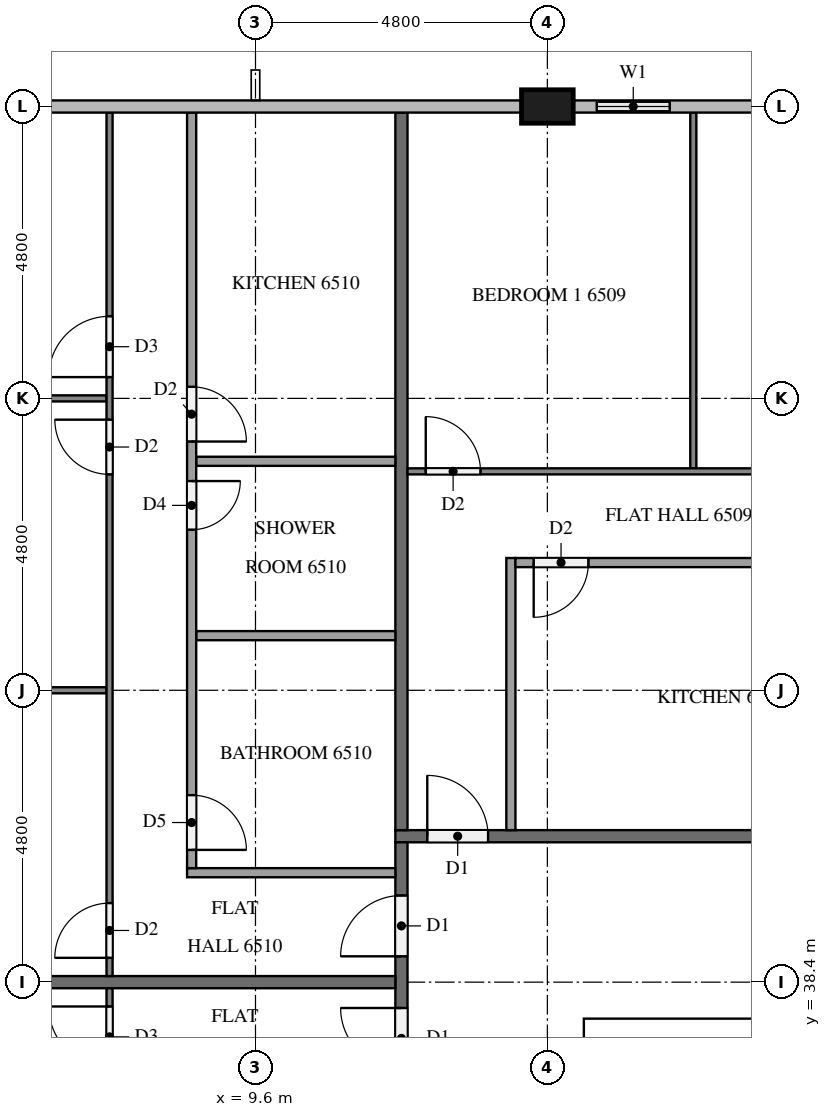
"""IFC4 building model, lengths in metres.
Left out: names, types, materials, properties, quantities, classifications, styles, units other than length and angle.
Written with IfcOpenShell. Run it as: python <this file> out.ifc"""

import sys

from ifc_helpers import new_model, si_unit, direction, frame, frame_2d, origin, origin_2d, place, context, subcontext, project, spatial, rectangle, extrude, element, fill, save


model = new_model("IFC4")
c1 = context("Model", 3, precision=1e-05, world=origin(), true_north=direction((0.0, 1.0)))
c2 = subcontext(c1, "Body", "Model", "MODEL_VIEW")
j1 = project(units=[si_unit("LENGTHUNIT", "METRE"), si_unit("PLANEANGLEUNIT", "RADIAN")], contexts=[c1])
p1 = place(None, origin())
s1 = spatial("IfcSite", under=j1, at=p1, CompositionType="ELEMENT")
p2 = place(p1, origin())
s2 = spatial("IfcBuilding", under=s1, at=p2, CompositionType="ELEMENT")
p3 = place(p2, frame((0.0, 0.0, 249.2)))
s3 = spatial("IfcBuildingStorey", under=s2, at=p3, CompositionType="ELEMENT", Elevation=249.2)
p4 = place(p3, frame((15.0, 37.5, 0.0), z_axis=(0.0, 0.0, 1.0), x_axis=(1.0, 0.0, 0.0)))
e1 = element("IfcWall", 1, at=p4, inside=s3, PredefinedType="SHEAR", context=c2, shape_type="SweptSolid", body=[
    extrude(rectangle(XDim=32.4, YDim=0.6, at=frame_2d((16.2, 0.0))), origin(), (0.0, 0.0, 1.0), 3.2),
])
p5 = place(p4, frame((15.3, 0.0, 0.0)))
e2 = element("IfcOpeningElement", 2, at=p5, cuts=e1, PredefinedType="OPENING", context=c2, shape_type="SweptSolid", body=[
    extrude(rectangle(XDim=1.8, YDim=2.1, at=frame_2d((0.9, 1.05))), frame((0.0, 0.31, 0.0), z_axis=(0.0, -1.0, 0.0), x_axis=(1.0, 0.0, 0.0)), (0.0, 0.0, 1.0), 0.62),
])
p6 = place(p4, frame((1.25, 0.0, 0.0)))
e3 = element("IfcOpeningElement", 3, at=p6, cuts=e1, PredefinedType="OPENING", context=c2, shape_type="SweptSolid", body=[
    extrude(rectangle(XDim=1.0, YDim=2.1, at=frame_2d((0.5, 1.05))), frame((0.0, 0.31, 0.0), z_axis=(0.0, -1.0, 0.0), x_axis=(1.0, 0.0, 0.0)), (0.0, 0.0, 1.0), 0.62),
])
p7 = place(p4, frame((4.988, 0.0, 0.0)))
e4 = element("IfcOpeningElement", 4, at=p7, cuts=e1, PredefinedType="OPENING", context=c2, shape_type="SweptSolid", body=[
    extrude(rectangle(XDim=1.0, YDim=2.1, at=frame_2d((0.5, 1.05))), frame((0.0, 0.31, 0.0), z_axis=(0.0, -1.0, 0.0), x_axis=(1.0, 0.0, 0.0)), (0.0, 0.0, 1.0), 0.62),
])
p8 = place(p3, frame((14.4, 52.8, 0.0), z_axis=(0.0, 0.0, 1.0), x_axis=(1.0, 0.0, 0.0)))
e5 = element("IfcColumn", 5, at=p8, inside=s3, PredefinedType="COLUMN", context=c2, shape_type="SweptSolid", body=[
    extrude(rectangle(XDim=0.85, YDim=0.55, at=origin_2d()), origin(), (0.0, 0.0, 1.0), 3.2),
])
p9 = place(p3, frame((16.8, 52.8, 0.0), z_axis=(0.0, 0.0, 1.0), x_axis=(-1.0, 0.0, 0.0)))
e6 = element("IfcWall", 6, at=p9, inside=s3, PredefinedType="SOLIDWALL", context=c2, shape_type="SweptSolid", body=[
    extrude(rectangle(XDim=1.975, YDim=0.15, at=frame_2d((0.988, 0.0))), origin(), (0.0, 0.0, 1.0), 3.2),
])
p10 = place(p9, frame((0.387, 0.0, 0.9)))
e7 = element("IfcOpeningElement", 7, at=p10, cuts=e6, PredefinedType="OPENING", context=c2, shape_type="SweptSolid", body=[
    extrude(rectangle(XDim=1.2, YDim=1.4, at=frame_2d((0.6, 0.7))), frame((0.0, 0.085, 0.0), z_axis=(0.0, -1.0, 0.0), x_axis=(1.0, 0.0, 0.0)), (0.0, 0.0, 1.0), 0.17),
])
p11 = place(p3, frame((11.9, 40.8, 0.0), z_axis=(0.0, 0.0, 1.0), x_axis=(1.0, 0.0, 0.0)))
e8 = element("IfcWall", 8, at=p11, inside=s3, PredefinedType="PARTITIONING", context=c2, shape_type="SweptSolid", body=[
    extrude(rectangle(XDim=38.6, YDim=0.2, at=frame_2d((19.3, 0.0))), origin(), (0.0, 0.0, 1.0), 3.2),
])
p12 = place(p11, frame((31.725, 0.0, 0.0)))
e9 = element("IfcOpeningElement", 9, at=p12, cuts=e8, PredefinedType="OPENING", context=c2, shape_type="SweptSolid", body=[
    extrude(rectangle(XDim=1.0, YDim=2.1, at=frame_2d((0.5, 1.05))), frame((0.0, 0.11, 0.0), z_axis=(0.0, -1.0, 0.0), x_axis=(1.0, 0.0, 0.0)), (0.0, 0.0, 1.0), 0.22),
])
p13 = place(p11, frame((17.325, 0.0, 0.0)))
e10 = element("IfcOpeningElement", 10, at=p13, cuts=e8, PredefinedType="OPENING", context=c2, shape_type="SweptSolid", body=[
    extrude(rectangle(XDim=1.0, YDim=2.1, at=frame_2d((0.5, 1.05))), frame((0.0, 0.11, 0.0), z_axis=(0.0, -1.0, 0.0), x_axis=(1.0, 0.0, 0.0)), (0.0, 0.0, 1.0), 0.22),
])
p14 = place(p11, frame((0.525, 0.0, 0.0)))
e11 = element("IfcOpeningElement", 11, at=p14, cuts=e8, PredefinedType="OPENING", context=c2, shape_type="SweptSolid", body=[
    extrude(rectangle(XDim=1.0, YDim=2.1, at=frame_2d((0.5, 1.05))), frame((0.0, 0.11, 0.0), z_axis=(0.0, -1.0, 0.0), x_axis=(1.0, 0.0, 0.0)), (0.0, 0.0, 1.0), 0.22),
])
p15 = place(p3, frame((12.0, 12.1, 0.0), z_axis=(0.0, 0.0, 1.0), x_axis=(0.0, 1.0, 0.0)))
e12 = element("IfcWall", 12, at=p15, inside=s3, PredefinedType="PARTITIONING", context=c2, shape_type="SweptSolid", body=[
    extrude(rectangle(XDim=28.6, YDim=0.2, at=frame_2d((14.3, 0.0))), origin(), (0.0, 0.0, 1.0), 3.2),
])
p16 = place(p15, frame((26.725, 0.0, 0.0)))
e13 = element("IfcOpeningElement", 13, at=p16, cuts=e12, PredefinedType="OPENING", context=c2, shape_type="SweptSolid", body=[
    extrude(rectangle(XDim=1.0, YDim=2.1, at=frame_2d((0.5, 1.05))), frame((0.0, 0.11, 0.0), z_axis=(0.0, -1.0, 0.0), x_axis=(1.0, 0.0, 0.0)), (0.0, 0.0, 1.0), 0.22),
])
p17 = place(p15, frame((24.875, 0.0, 0.0)))
e14 = element("IfcOpeningElement", 14, at=p17, cuts=e12, PredefinedType="OPENING", context=c2, shape_type="SweptSolid", body=[
    extrude(rectangle(XDim=1.0, YDim=2.1, at=frame_2d((0.5, 1.05))), frame((0.0, 0.11, 0.0), z_axis=(0.0, -1.0, 0.0), x_axis=(1.0, 0.0, 0.0)), (0.0, 0.0, 1.0), 0.22),
])
p18 = place(p15, frame((17.675, 0.0, 0.0)))
e15 = element("IfcOpeningElement", 15, at=p18, cuts=e12, PredefinedType="OPENING", context=c2, shape_type="SweptSolid", body=[
    extrude(rectangle(XDim=1.0, YDim=2.1, at=frame_2d((0.5, 1.05))), frame((0.0, 0.11, 0.0), z_axis=(0.0, -1.0, 0.0), x_axis=(1.0, 0.0, 0.0)), (0.0, 0.0, 1.0), 0.22),
])
p19 = place(p15, frame((2.725, 0.0, 0.0)))
e16 = element("IfcOpeningElement", 16, at=p19, cuts=e12, PredefinedType="OPENING", context=c2, shape_type="SweptSolid", body=[
    extrude(rectangle(XDim=1.0, YDim=2.1, at=frame_2d((0.5, 1.05))), frame((0.0, 0.11, 0.0), z_axis=(0.0, -1.0, 0.0), x_axis=(1.0, 0.0, 0.0)), (0.0, 0.0, 1.0), 0.22),
])
p20 = place(p15, frame((0.875, 0.0, 0.0)))
e17 = element("IfcOpeningElement", 17, at=p20, cuts=e12, PredefinedType="OPENING", context=c2, shape_type="SweptSolid", body=[
    extrude(rectangle(XDim=1.0, YDim=2.1, at=frame_2d((0.5, 1.05))), frame((0.0, 0.11, 0.0), z_axis=(0.0, -1.0, 0.0), x_axis=(1.0, 0.0, 0.0)), (0.0, 0.0, 1.0), 0.22),
])
p21 = place(p3, frame((12.0, 52.7, 0.0), z_axis=(0.0, 0.0, 1.0), x_axis=(0.0, -1.0, 0.0)))
e18 = element("IfcWall", 18, at=p21, inside=s3, PredefinedType="PARTITIONING", context=c2, shape_type="SweptSolid", body=[
    extrude(rectangle(XDim=11.8, YDim=0.2, at=frame_2d((5.9, 0.0))), origin(), (0.0, 0.0, 1.0), 3.2),
])
p22 = place(p3, frame((0.275, 38.4, 0.0), z_axis=(0.0, 0.0, 1.0), x_axis=(1.0, 0.0, 0.0)))
e19 = element("IfcWall", 19, at=p22, inside=s3, PredefinedType="PARTITIONING", context=c2, shape_type="SweptSolid", body=[
    extrude(rectangle(XDim=11.625, YDim=0.2, at=frame_2d((5.812, 0.0))), origin(), (0.0, 0.0, 1.0), 3.2),
])
p23 = place(p3, frame((16.8, 46.85, 0.0), z_axis=(0.0, 0.0, 1.0), x_axis=(0.0, 1.0, 0.0)))
e20 = element("IfcWall", 20, at=p23, inside=s3, PredefinedType="PARTITIONING", context=c2, shape_type="SweptSolid", body=[
    extrude(rectangle(XDim=5.85, YDim=0.1, at=frame_2d((2.925, 0.0))), origin(), (0.0, 0.0, 1.0), 3.2),
])
p24 = place(p3, frame((12.1, 46.8, 0.0), z_axis=(0.0, 0.0, 1.0), x_axis=(1.0, 0.0, 0.0)))
e21 = element("IfcWall", 21, at=p24, inside=s3, PredefinedType="PARTITIONING", context=c2, shape_type="SweptSolid", body=[
    extrude(rectangle(XDim=16.6, YDim=0.1, at=frame_2d((8.3, 0.0))), origin(), (0.0, 0.0, 1.0), 3.2),
])
p25 = place(p24, frame((0.3, 0.0, 0.0)))
e22 = element("IfcOpeningElement", 22, at=p25, cuts=e21, PredefinedType="OPENING", context=c2, shape_type="SweptSolid", body=[
    extrude(rectangle(XDim=0.9, YDim=2.1, at=frame_2d((0.45, 1.05))), frame((0.0, 0.06, 0.0), z_axis=(0.0, -1.0, 0.0), x_axis=(1.0, 0.0, 0.0)), (0.0, 0.0, 1.0), 0.12),
])
p26 = place(p24, frame((8.25, 0.0, 0.0)))
e23 = element("IfcOpeningElement", 23, at=p26, cuts=e21, PredefinedType="OPENING", context=c2, shape_type="SweptSolid", body=[
    extrude(rectangle(XDim=0.9, YDim=2.1, at=frame_2d((0.45, 1.05))), frame((0.0, 0.06, 0.0), z_axis=(0.0, -1.0, 0.0), x_axis=(1.0, 0.0, 0.0)), (0.0, 0.0, 1.0), 0.12),
])
p27 = place(p24, frame((9.85, 0.0, 0.0)))
e24 = element("IfcOpeningElement", 24, at=p27, cuts=e21, PredefinedType="OPENING", context=c2, shape_type="SweptSolid", body=[
    extrude(rectangle(XDim=1.0, YDim=2.1, at=frame_2d((0.5, 1.05))), frame((0.0, 0.06, 0.0), z_axis=(0.0, -1.0, 0.0), x_axis=(1.0, 0.0, 0.0)), (0.0, 0.0, 1.0), 0.12),
])
p28 = place(p3, frame((13.8, 40.9, 0.0), z_axis=(0.0, 0.0, 1.0), x_axis=(0.0, 1.0, 0.0)))
e25 = element("IfcWall", 25, at=p28, inside=s3, PredefinedType="PARTITIONING", context=c2, shape_type="SweptSolid", body=[
    extrude(rectangle(XDim=4.475, YDim=0.15, at=frame_2d((2.238, 0.0))), origin(), (0.0, 0.0, 1.0), 3.2),
])
p29 = place(p3, frame((28.7, 45.3, 0.0), z_axis=(0.0, 0.0, 1.0), x_axis=(-1.0, 0.0, 0.0)))
e26 = element("IfcWall", 26, at=p29, inside=s3, PredefinedType="PARTITIONING", context=c2, shape_type="SweptSolid", body=[
    extrude(rectangle(XDim=14.825, YDim=0.15, at=frame_2d((7.413, 0.0))), origin(), (0.0, 0.0, 1.0), 3.2),
])
p30 = place(p29, frame((13.625, 0.0, 0.0)))
e27 = element("IfcOpeningElement", 27, at=p30, cuts=e26, PredefinedType="OPENING", context=c2, shape_type="SweptSolid", body=[
    extrude(rectangle(XDim=0.9, YDim=2.1, at=frame_2d((0.45, 1.05))), frame((0.0, 0.085, 0.0), z_axis=(0.0, -1.0, 0.0), x_axis=(1.0, 0.0, 0.0)), (0.0, 0.0, 1.0), 0.17),
])
p31 = place(p29, frame((4.886, 0.0, 0.0)))
e28 = element("IfcOpeningElement", 28, at=p31, cuts=e26, PredefinedType="OPENING", context=c2, shape_type="SweptSolid", body=[
    extrude(rectangle(XDim=0.8, YDim=2.1, at=frame_2d((0.4, 1.05))), frame((0.0, 0.085, 0.0), z_axis=(0.0, -1.0, 0.0), x_axis=(1.0, 0.0, 0.0)), (0.0, 0.0, 1.0), 0.17),
])
p32 = place(p29, frame((3.336, 0.0, 0.0)))
e29 = element("IfcOpeningElement", 29, at=p32, cuts=e26, PredefinedType="OPENING", context=c2, shape_type="SweptSolid", body=[
    extrude(rectangle(XDim=0.9, YDim=2.1, at=frame_2d((0.45, 1.05))), frame((0.0, 0.085, 0.0), z_axis=(0.0, -1.0, 0.0), x_axis=(1.0, 0.0, 0.0)), (0.0, 0.0, 1.0), 0.17),
])
p33 = place(p3, frame((7.15, 43.2, 0.0), z_axis=(0.0, 0.0, 1.0), x_axis=(-1.0, 0.0, 0.0)))
e30 = element("IfcWall", 30, at=p33, inside=s3, PredefinedType="PARTITIONING", context=c2, shape_type="SweptSolid", body=[
    extrude(rectangle(XDim=7.05, YDim=0.1, at=frame_2d((3.525, 0.0))), origin(), (0.0, 0.0, 1.0), 3.2),
])
p34 = place(p3, frame((7.15, 48.0, 0.0), z_axis=(0.0, 0.0, 1.0), x_axis=(-1.0, 0.0, 0.0)))
e31 = element("IfcWall", 31, at=p34, inside=s3, PredefinedType="PARTITIONING", context=c2, shape_type="SweptSolid", body=[
    extrude(rectangle(XDim=6.8, YDim=0.1, at=frame_2d((3.4, 0.0))), origin(), (0.0, 0.0, 1.0), 3.2),
])
p35 = place(p3, frame((7.2, 38.5, 0.0), z_axis=(0.0, 0.0, 1.0), x_axis=(0.0, 1.0, 0.0)))
e32 = element("IfcWall", 32, at=p35, inside=s3, PredefinedType="PARTITIONING", context=c2, shape_type="SweptSolid", body=[
    extrude(rectangle(XDim=14.2, YDim=0.1, at=frame_2d((7.1, 0.0))), origin(), (0.0, 0.0, 1.0), 3.2),
])
p36 = place(p35, frame((0.3, 0.0, 0.0)))
e33 = element("IfcOpeningElement", 33, at=p36, cuts=e32, PredefinedType="OPENING", context=c2, shape_type="SweptSolid", body=[
    extrude(rectangle(XDim=0.9, YDim=2.1, at=frame_2d((0.45, 1.05))), frame((0.0, 0.06, 0.0), z_axis=(0.0, -1.0, 0.0), x_axis=(1.0, 0.0, 0.0)), (0.0, 0.0, 1.0), 0.12),
])
p37 = place(p35, frame((8.25, 0.0, 0.0)))
e34 = element("IfcOpeningElement", 34, at=p37, cuts=e32, PredefinedType="OPENING", context=c2, shape_type="SweptSolid", body=[
    extrude(rectangle(XDim=0.9, YDim=2.1, at=frame_2d((0.45, 1.05))), frame((0.0, 0.06, 0.0), z_axis=(0.0, -1.0, 0.0), x_axis=(1.0, 0.0, 0.0)), (0.0, 0.0, 1.0), 0.12),
])
p38 = place(p35, frame((9.85, 0.0, 0.0)))
e35 = element("IfcOpeningElement", 35, at=p38, cuts=e32, PredefinedType="OPENING", context=c2, shape_type="SweptSolid", body=[
    extrude(rectangle(XDim=1.0, YDim=2.1, at=frame_2d((0.5, 1.05))), frame((0.0, 0.06, 0.0), z_axis=(0.0, -1.0, 0.0), x_axis=(1.0, 0.0, 0.0)), (0.0, 0.0, 1.0), 0.12),
])
for number, where, z_axis, x_axis in (
    (36, (11.9, 44.098, 0.0), (0.0, 0.0, 1.0), (-1.0, 0.0, 0.0)),
    (37, (11.9, 46.965, 0.0), (0.0, 0.0, 1.0), (-1.0, 0.0, 0.0)),
):
    element("IfcWall", number, at=place(p3, frame(where, z_axis=z_axis, x_axis=x_axis)), inside=s3, PredefinedType="PARTITIONING", context=c2, shape_type="SweptSolid", body=[
        extrude(rectangle(XDim=3.275, YDim=0.15, at=frame_2d((1.637, 0.0))), origin(), (0.0, 0.0, 1.0), 3.2),
    ])
p39 = place(p3, frame((11.9, 40.2, 0.0), z_axis=(0.0, 0.0, 1.0), x_axis=(-1.0, 0.0, 0.0)))
e38 = element("IfcWall", 38, at=p39, inside=s3, PredefinedType="PARTITIONING", context=c2, shape_type="SweptSolid", body=[
    extrude(rectangle(XDim=3.425, YDim=0.15, at=frame_2d((1.712, 0.0))), origin(), (0.0, 0.0, 1.0), 3.2),
])
p40 = place(p3, frame((8.55, 52.7, 0.0), z_axis=(0.0, 0.0, 1.0), x_axis=(0.0, -1.0, 0.0)))
e39 = element("IfcWall", 39, at=p40, inside=s3, PredefinedType="PARTITIONING", context=c2, shape_type="SweptSolid", body=[
    extrude(rectangle(XDim=12.425, YDim=0.15, at=frame_2d((6.212, 0.0))), origin(), (0.0, 0.0, 1.0), 3.2),
])
p41 = place(p40, frame((11.225, 0.0, 0.0)))
e40 = element("IfcOpeningElement", 40, at=p41, cuts=e39, PredefinedType="OPENING", context=c2, shape_type="SweptSolid", body=[
    extrude(rectangle(XDim=0.9, YDim=2.1, at=frame_2d((0.45, 1.05))), frame((0.0, 0.085, 0.0), z_axis=(0.0, -1.0, 0.0), x_axis=(1.0, 0.0, 0.0)), (0.0, 0.0, 1.0), 0.17),
])
p42 = place(p40, frame((6.06, 0.0, 0.0)))
e41 = element("IfcOpeningElement", 41, at=p42, cuts=e39, PredefinedType="OPENING", context=c2, shape_type="SweptSolid", body=[
    extrude(rectangle(XDim=0.8, YDim=2.1, at=frame_2d((0.4, 1.05))), frame((0.0, 0.085, 0.0), z_axis=(0.0, -1.0, 0.0), x_axis=(1.0, 0.0, 0.0)), (0.0, 0.0, 1.0), 0.17),
])
p43 = place(p40, frame((4.51, 0.0, 0.0)))
e42 = element("IfcOpeningElement", 42, at=p43, cuts=e39, PredefinedType="OPENING", context=c2, shape_type="SweptSolid", body=[
    extrude(rectangle(XDim=0.9, YDim=2.1, at=frame_2d((0.45, 1.05))), frame((0.0, 0.085, 0.0), z_axis=(0.0, -1.0, 0.0), x_axis=(1.0, 0.0, 0.0)), (0.0, 0.0, 1.0), 0.17),
])
p44 = place(p3, frame((7.2, 31.3, 0.0), z_axis=(0.0, 0.0, 1.0), x_axis=(0.0, 1.0, 0.0)))
e43 = element("IfcWall", 43, at=p44, inside=s3, PredefinedType="PARTITIONING", context=c2, shape_type="SweptSolid", body=[
    extrude(rectangle(XDim=7.0, YDim=0.1, at=frame_2d((3.5, 0.0))), origin(), (0.0, 0.0, 1.0), 3.2),
])
p45 = place(p44, frame((5.7, 0.0, 0.0)))
e44 = element("IfcOpeningElement", 44, at=p45, cuts=e43, PredefinedType="OPENING", context=c2, shape_type="SweptSolid", body=[
    extrude(rectangle(XDim=1.0, YDim=2.1, at=frame_2d((0.5, 1.05))), frame((0.0, 0.06, 0.0), z_axis=(0.0, -1.0, 0.0), x_axis=(1.0, 0.0, 0.0)), (0.0, 0.0, 1.0), 0.12),
])
p46 = place(p10, origin())
e45 = element("IfcWindow", 45, at=p46, inside=s3, PartitioningType="SINGLE_PANEL", PredefinedType="WINDOW", context=c2, shape_type="SweptSolid", body=[
    extrude(rectangle(XDim=1.2, YDim=1.4, at=frame_2d((0.6, 0.7))), frame((0.0, 0.03, 0.0), z_axis=(0.0, -1.0, 0.0), x_axis=(1.0, 0.0, 0.0)), (0.0, 0.0, 1.0), 0.06),
])
fill(e7, e45)
p47 = place(p6, origin())
e46 = element("IfcDoor", 46, at=p47, inside=s3, OperationType="SINGLE_SWING_RIGHT", PredefinedType="DOOR", context=c2, shape_type="SweptSolid", body=[
    extrude(rectangle(XDim=1.0, YDim=2.1, at=frame_2d((0.5, 1.05))), frame((0.0, 0.025, 0.0), z_axis=(0.0, -1.0, 0.0), x_axis=(1.0, 0.0, 0.0)), (0.0, 0.0, 1.0), 0.05),
])
fill(e3, e46)
p48 = place(p14, origin())
e47 = element("IfcDoor", 47, at=p48, inside=s3, OperationType="SINGLE_SWING_LEFT", PredefinedType="DOOR", context=c2, shape_type="SweptSolid", body=[
    extrude(rectangle(XDim=1.0, YDim=2.1, at=frame_2d((0.5, 1.05))), frame((0.0, 0.025, 0.0), z_axis=(0.0, -1.0, 0.0), x_axis=(1.0, 0.0, 0.0)), (0.0, 0.0, 1.0), 0.05),
])
fill(e11, e47)
p49 = place(p16, origin())
e48 = element("IfcDoor", 48, at=p49, inside=s3, OperationType="SINGLE_SWING_LEFT", PredefinedType="DOOR", context=c2, shape_type="SweptSolid", body=[
    extrude(rectangle(XDim=1.0, YDim=2.1, at=frame_2d((0.5, 1.05))), frame((0.0, 0.025, 0.0), z_axis=(0.0, -1.0, 0.0), x_axis=(1.0, 0.0, 0.0)), (0.0, 0.0, 1.0), 0.05),
])
fill(e13, e48)
p50 = place(p17, origin())
e49 = element("IfcDoor", 49, at=p50, inside=s3, OperationType="SINGLE_SWING_RIGHT", PredefinedType="DOOR", context=c2, shape_type="SweptSolid", body=[
    extrude(rectangle(XDim=1.0, YDim=2.1, at=frame_2d((0.5, 1.05))), frame((0.0, 0.025, 0.0), z_axis=(0.0, -1.0, 0.0), x_axis=(1.0, 0.0, 0.0)), (0.0, 0.0, 1.0), 0.05),
])
fill(e14, e49)
p51 = place(p25, origin())
e50 = element("IfcDoor", 50, at=p51, inside=s3, OperationType="SINGLE_SWING_LEFT", PredefinedType="DOOR", context=c2, shape_type="SweptSolid", body=[
    extrude(rectangle(XDim=0.9, YDim=2.1, at=frame_2d((0.45, 1.05))), frame((0.0, 0.025, 0.0), z_axis=(0.0, -1.0, 0.0), x_axis=(1.0, 0.0, 0.0)), (0.0, 0.0, 1.0), 0.05),
])
fill(e22, e50)
p52 = place(p30, origin())
e51 = element("IfcDoor", 51, at=p52, inside=s3, OperationType="SINGLE_SWING_RIGHT", PredefinedType="DOOR", context=c2, shape_type="SweptSolid", body=[
    extrude(rectangle(XDim=0.9, YDim=2.1, at=frame_2d((0.45, 1.05))), frame((0.0, 0.025, 0.0), z_axis=(0.0, -1.0, 0.0), x_axis=(1.0, 0.0, 0.0)), (0.0, 0.0, 1.0), 0.05),
])
fill(e27, e51)
p53 = place(p36, origin())
e52 = element("IfcDoor", 52, at=p53, inside=s3, OperationType="SINGLE_SWING_LEFT", PredefinedType="DOOR", context=c2, shape_type="SweptSolid", body=[
    extrude(rectangle(XDim=0.9, YDim=2.1, at=frame_2d((0.45, 1.05))), frame((0.0, 0.025, 0.0), z_axis=(0.0, -1.0, 0.0), x_axis=(1.0, 0.0, 0.0)), (0.0, 0.0, 1.0), 0.05),
])
fill(e33, e52)
p54 = place(p37, origin())
e53 = element("IfcDoor", 53, at=p54, inside=s3, OperationType="SINGLE_SWING_RIGHT", PredefinedType="DOOR", context=c2, shape_type="SweptSolid", body=[
    extrude(rectangle(XDim=0.9, YDim=2.1, at=frame_2d((0.45, 1.05))), frame((0.0, 0.025, 0.0), z_axis=(0.0, -1.0, 0.0), x_axis=(1.0, 0.0, 0.0)), (0.0, 0.0, 1.0), 0.05),
])
fill(e34, e53)
p55 = place(p38, origin())
e54 = element("IfcDoor", 54, at=p55, inside=s3, OperationType="SINGLE_SWING_LEFT", PredefinedType="DOOR", context=c2, shape_type="SweptSolid", body=[
    extrude(rectangle(XDim=1.0, YDim=2.1, at=frame_2d((0.5, 1.05))), frame((0.0, 0.025, 0.0), z_axis=(0.0, -1.0, 0.0), x_axis=(1.0, 0.0, 0.0)), (0.0, 0.0, 1.0), 0.05),
])
fill(e35, e54)
p56 = place(p41, origin())
e55 = element("IfcDoor", 55, at=p56, inside=s3, OperationType="SINGLE_SWING_RIGHT", PredefinedType="DOOR", context=c2, shape_type="SweptSolid", body=[
    extrude(rectangle(XDim=0.9, YDim=2.1, at=frame_2d((0.45, 1.05))), frame((0.0, 0.025, 0.0), z_axis=(0.0, -1.0, 0.0), x_axis=(1.0, 0.0, 0.0)), (0.0, 0.0, 1.0), 0.05),
])
fill(e40, e55)
p57 = place(p42, origin())
e56 = element("IfcDoor", 56, at=p57, inside=s3, OperationType="SINGLE_SWING_LEFT", PredefinedType="DOOR", context=c2, shape_type="SweptSolid", body=[
    extrude(rectangle(XDim=0.8, YDim=2.1, at=frame_2d((0.4, 1.05))), frame((0.0, 0.025, 0.0), z_axis=(0.0, -1.0, 0.0), x_axis=(1.0, 0.0, 0.0)), (0.0, 0.0, 1.0), 0.05),
])
fill(e41, e56)
p58 = place(p43, origin())
e57 = element("IfcDoor", 57, at=p58, inside=s3, OperationType="SINGLE_SWING_RIGHT", PredefinedType="DOOR", context=c2, shape_type="SweptSolid", body=[
    extrude(rectangle(XDim=0.9, YDim=2.1, at=frame_2d((0.45, 1.05))), frame((0.0, 0.025, 0.0), z_axis=(0.0, -1.0, 0.0), x_axis=(1.0, 0.0, 0.0)), (0.0, 0.0, 1.0), 0.05),
])
fill(e42, e57)
p59 = place(p45, origin())
e58 = element("IfcDoor", 58, at=p59, inside=s3, OperationType="SINGLE_SWING_RIGHT", PredefinedType="DOOR", context=c2, shape_type="SweptSolid", body=[
    extrude(rectangle(XDim=1.0, YDim=2.1, at=frame_2d((0.5, 1.05))), frame((0.0, 0.025, 0.0), z_axis=(0.0, -1.0, 0.0), x_axis=(1.0, 0.0, 0.0)), (0.0, 0.0, 1.0), 0.05),
])
fill(e44, e58)
save(model, sys.argv[1])
